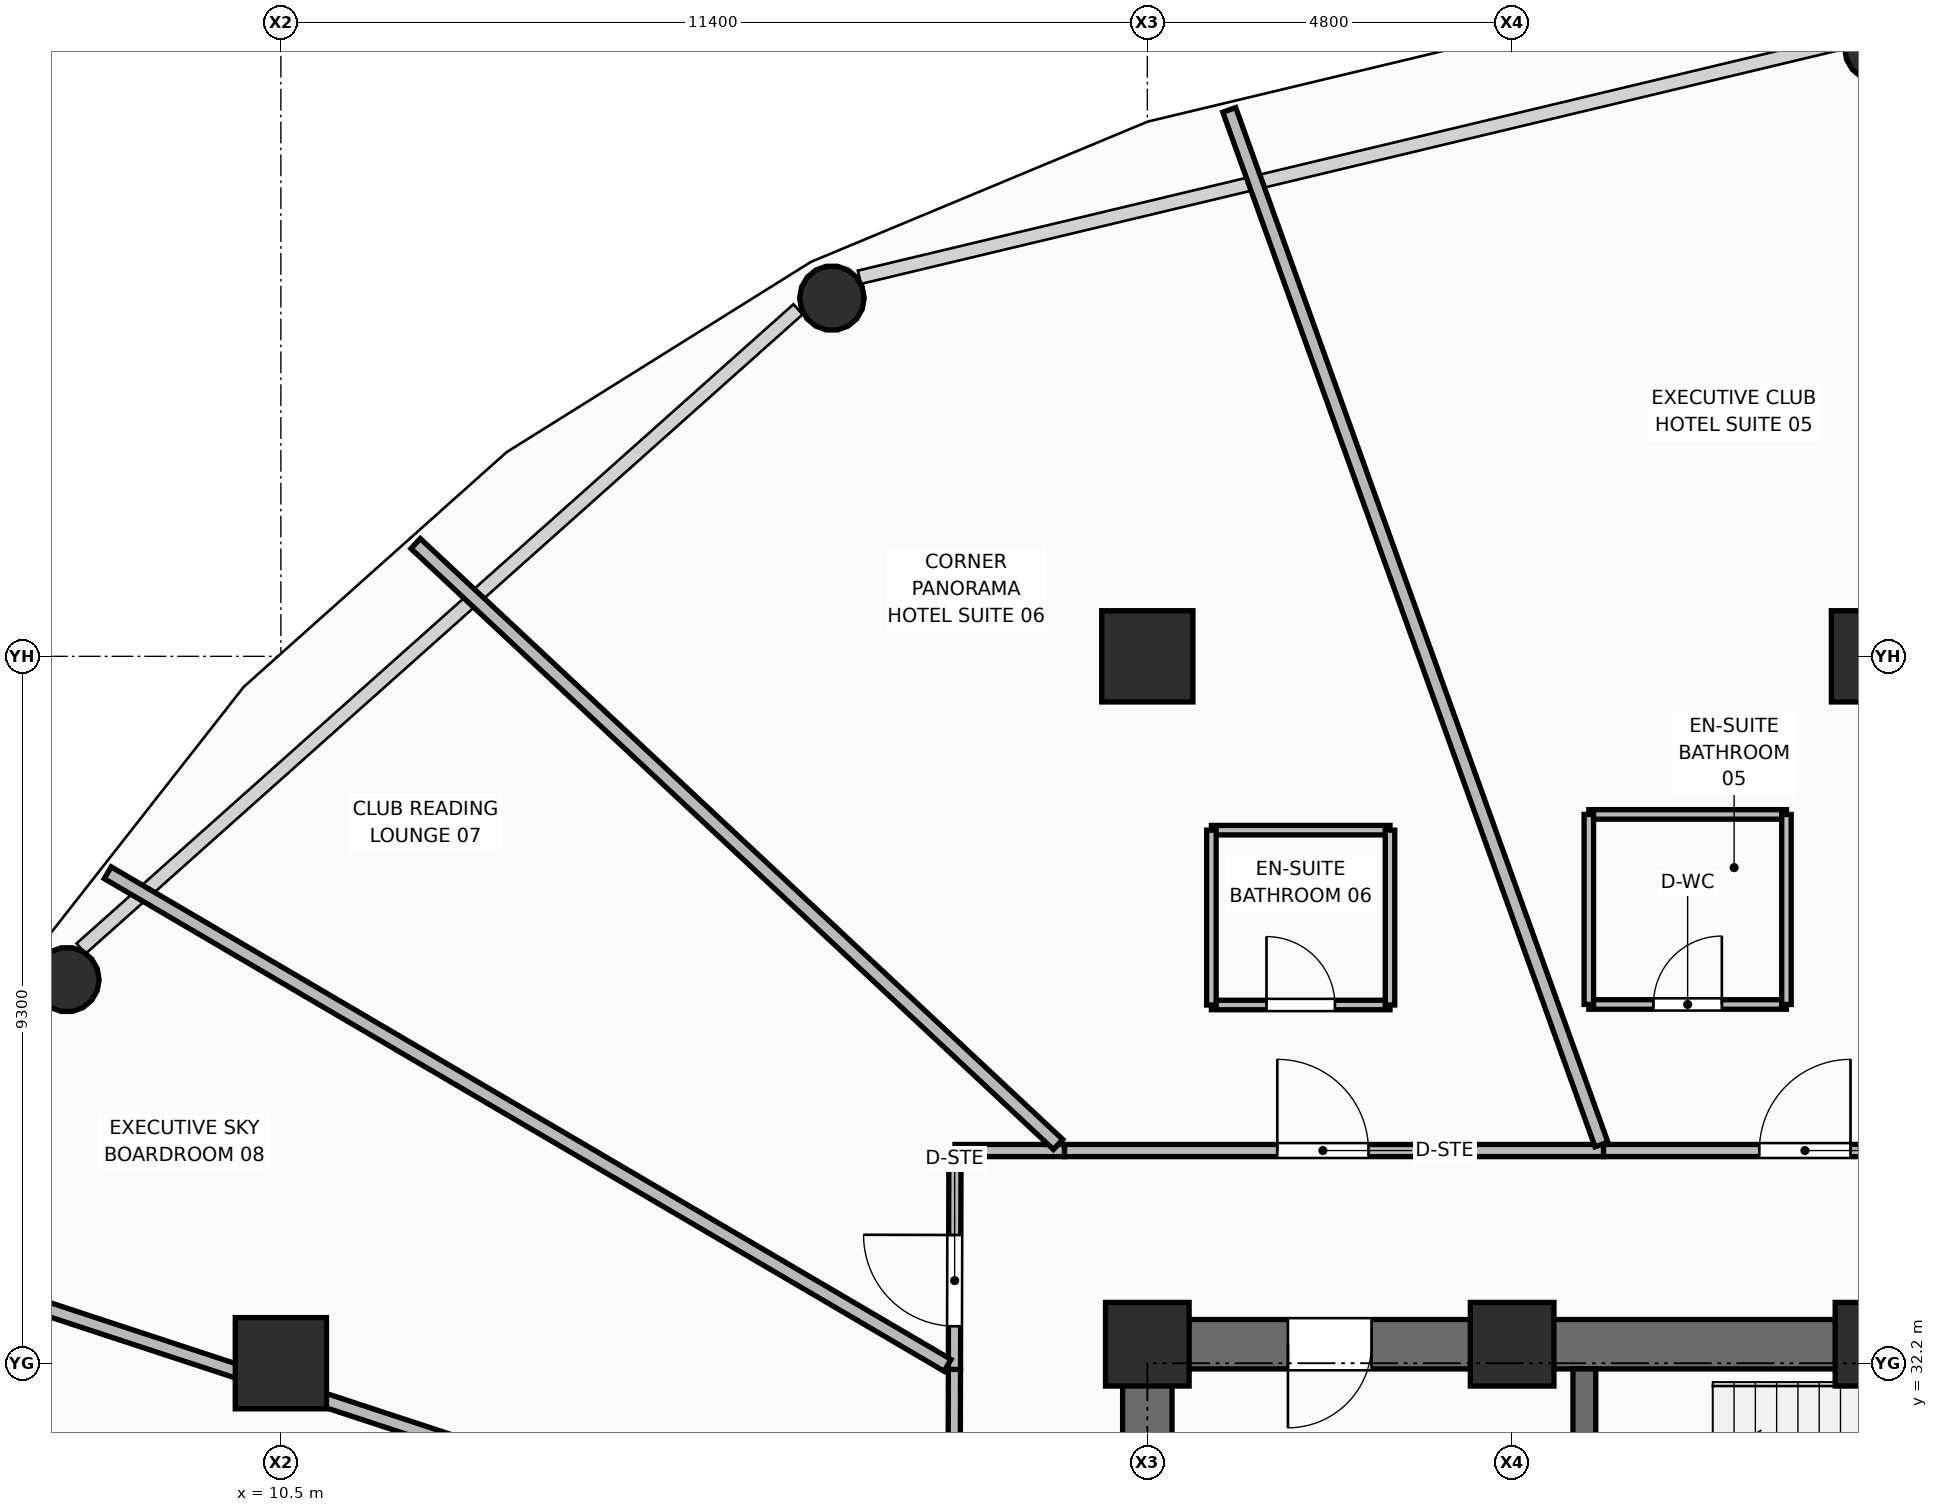
"""IFC4 building model, lengths in metres.
Left out: names, types, materials, properties, quantities, classifications, styles, units other than length and angle.
Written with IfcOpenShell. Run it as: python <this file> out.ifc"""

import sys

from ifc_helpers import new_model, si_unit, direction, frame, frame_2d, origin, origin_2d, place, context, subcontext, project, spatial, rectangle, hollow_rectangle, hollow_circle, extrude, element, fill, save


model = new_model("IFC4")
c1 = context("Model", 3, precision=1e-05, world=origin(), true_north=direction((0.0, 1.0)))
c2 = subcontext(c1, "Body", "Model", "MODEL_VIEW")
j1 = project(units=[si_unit("LENGTHUNIT", "METRE"), si_unit("PLANEANGLEUNIT", "RADIAN")], contexts=[c1])
p1 = place(None, origin())
s1 = spatial("IfcSite", under=j1, at=p1, CompositionType="ELEMENT")
p2 = place(p1, origin())
s2 = spatial("IfcBuilding", under=s1, at=p2, CompositionType="ELEMENT")
p3 = place(p2, frame((0.0, 0.0, 83.25)))
s3 = spatial("IfcBuildingStorey", under=s2, at=p3, CompositionType="ELEMENT", Elevation=83.25)
for number, where, z_axis, x_axis in (
    (1, (21.9, 32.45, 0.0), (0.0, 0.0, 1.0), (1.0, 0.0, 0.0)),
    (2, (26.7, 32.45, 0.0), (0.0, 0.0, 1.0), (1.0, 0.0, 0.0)),
    (3, (31.5, 32.45, 0.0), (0.0, 0.0, 1.0), (1.0, 0.0, 0.0)),
):
    element("IfcColumn", number, at=place(p3, frame(where, z_axis=z_axis, x_axis=x_axis)), inside=s3, PredefinedType="COLUMN", context=c2, shape_type="SweptSolid", body=[
        extrude(rectangle(XDim=1.1, YDim=1.1, at=origin_2d()), origin(), (0.0, 0.0, 1.0), 3.75),
    ])
for number, where, z_axis, x_axis in (
    (4, (10.5, 32.2, 0.0), (0.0, 0.0, 1.0), (1.0, 0.0, 0.0)),
    (5, (21.9, 41.5, 0.0), (0.0, 0.0, 1.0), (1.0, 0.0, 0.0)),
    (6, (31.5, 41.5, 0.0), (0.0, 0.0, 1.0), (1.0, 0.0, 0.0)),
):
    element("IfcColumn", number, at=place(p3, frame(where, z_axis=z_axis, x_axis=x_axis)), inside=s3, PredefinedType="COLUMN", context=c2, shape_type="SweptSolid", body=[
        extrude(hollow_rectangle(XDim=1.2, YDim=1.2, WallThickness=0.045, at=origin_2d()), origin(), (0.0, 0.0, 1.0), 3.75),
    ])
for number, where, z_axis, x_axis in (
    (7, (31.5, 49.495, 0.0), (0.0, 0.0, 1.0), (1.0, 0.0, 0.0)),
    (8, (17.75, 46.213, 0.0), (0.0, 0.0, 1.0), (1.0, 0.0, 0.0)),
    (9, (7.684, 37.247, 0.0), (0.0, 0.0, 1.0), (1.0, 0.0, 0.0)),
):
    element("IfcColumn", number, at=place(p3, frame(where, z_axis=z_axis, x_axis=x_axis)), inside=s3, PredefinedType="COLUMN", context=c2, shape_type="SweptSolid", body=[
        extrude(hollow_circle(Radius=0.425, WallThickness=0.04, at=origin_2d()), origin(), (0.0, 0.0, 1.0), 3.57),
    ])
p4 = place(p3, frame((21.575, 32.45, 0.0), z_axis=(0.0, 0.0, 1.0), x_axis=(1.0, 0.0, 0.0)))
e10 = element("IfcWall", 10, at=p4, inside=s3, PredefinedType="SHEAR", context=c2, shape_type="SweptSolid", body=[
    extrude(rectangle(XDim=19.85, YDim=0.65, at=frame_2d((9.925, 0.0))), origin(), (0.0, 0.0, 1.0), 3.57),
])
p5 = place(p4, frame((2.175, 0.0, 0.0)))
e11 = element("IfcOpeningElement", 11, at=p5, cuts=e10, PredefinedType="OPENING", context=c2, shape_type="SweptSolid", body=[
    extrude(rectangle(XDim=1.1, YDim=2.1, at=frame_2d((0.55, 1.05))), frame((0.0, 0.335, 0.0), z_axis=(0.0, -1.0, 0.0), x_axis=(1.0, 0.0, 0.0)), (0.0, 0.0, 1.0), 0.67),
])
p6 = place(p4, frame((15.565, 0.0, 0.0)))
e12 = element("IfcOpeningElement", 12, at=p6, cuts=e10, PredefinedType="OPENING", context=c2, shape_type="SweptSolid", body=[
    extrude(rectangle(XDim=1.0, YDim=2.1, at=frame_2d((0.5, 1.05))), frame((0.0, 0.335, 0.0), z_axis=(0.0, -1.0, 0.0), x_axis=(1.0, 0.0, 0.0)), (0.0, 0.0, 1.0), 0.67),
])
p7 = place(p4, frame((17.575, 0.0, 0.0)))
e13 = element("IfcOpeningElement", 13, at=p7, cuts=e10, PredefinedType="OPENING", context=c2, shape_type="SweptSolid", body=[
    extrude(rectangle(XDim=0.9, YDim=2.1, at=frame_2d((0.45, 1.05))), frame((0.0, 0.335, 0.0), z_axis=(0.0, -1.0, 0.0), x_axis=(1.0, 0.0, 0.0)), (0.0, 0.0, 1.0), 0.67),
])
p8 = place(p3, frame((21.9, 18.125, 0.0), z_axis=(0.0, 0.0, 1.0), x_axis=(0.0, 1.0, 0.0)))
e14 = element("IfcWall", 14, at=p8, inside=s3, PredefinedType="SHEAR", context=c2, shape_type="SweptSolid", body=[
    extrude(rectangle(XDim=14.0, YDim=0.65, at=frame_2d((7.0, 0.0))), origin(), (0.0, 0.0, 1.0), 3.57),
])
p9 = place(p3, frame((27.65, 28.75, 0.0), z_axis=(0.0, 0.0, 1.0), x_axis=(0.0, 1.0, 0.0)))
e15 = element("IfcWall", 15, at=p9, inside=s3, PredefinedType="SHEAR", context=c2, shape_type="SweptSolid", body=[
    extrude(rectangle(XDim=3.375, YDim=0.3, at=frame_2d((1.688, 0.0))), origin(), (0.0, 0.0, 1.0), 3.57),
])
p10 = place(p9, frame((1.0, 0.0, 0.0)))
e16 = element("IfcOpeningElement", 16, at=p10, cuts=e15, PredefinedType="OPENING", context=c2, shape_type="SweptSolid", body=[
    extrude(rectangle(XDim=1.05, YDim=2.1, at=frame_2d((0.525, 1.05))), frame((0.0, 0.16, 0.0), z_axis=(0.0, -1.0, 0.0), x_axis=(1.0, 0.0, 0.0)), (0.0, 0.0, 1.0), 0.32),
])
p11 = place(p3, frame((19.355, 28.993, 0.0), z_axis=(0.0, 0.0, 1.0), x_axis=(0.002264911404, 0.999997435085, 0.0)))
e17 = element("IfcWall", 17, at=p11, inside=s3, PredefinedType="PARTITIONING", context=c2, shape_type="SweptSolid", body=[
    extrude(rectangle(XDim=3.126, YDim=0.16, at=frame_2d((1.563, 0.0))), origin(), (0.0, 0.0, 1.0), 3.55),
])
p12 = place(p11, frame((0.598, 0.0, 0.0)))
e18 = element("IfcOpeningElement", 18, at=p12, cuts=e17, PredefinedType="OPENING", context=c2, shape_type="SweptSolid", body=[
    extrude(rectangle(XDim=1.2, YDim=2.1, at=frame_2d((0.6, 1.05))), frame((0.0, 0.09, 0.0), z_axis=(0.0, -1.0, 0.0), x_axis=(1.0, 0.0, 0.0)), (0.0, 0.0, 1.0), 0.18),
])
p13 = place(p3, frame((19.362, 32.119, 0.0), z_axis=(0.0, 0.0, 1.0), x_axis=(0.002374283141, 0.999997181386, 0.0)))
e19 = element("IfcWall", 19, at=p13, inside=s3, PredefinedType="PARTITIONING", context=c2, shape_type="SweptSolid", body=[
    extrude(rectangle(XDim=2.879, YDim=0.16, at=frame_2d((1.439, 0.0))), origin(), (0.0, 0.0, 1.0), 2.928),
])
p14 = place(p13, frame((0.568, 0.0, 0.0)))
e20 = element("IfcOpeningElement", 20, at=p14, cuts=e19, PredefinedType="OPENING", context=c2, shape_type="SweptSolid", body=[
    extrude(rectangle(XDim=1.2, YDim=2.1, at=frame_2d((0.6, 1.05))), frame((0.0, 0.09, 0.0), z_axis=(0.0, -1.0, 0.0), x_axis=(1.0, 0.0, 0.0)), (0.0, 0.0, 1.0), 0.18),
])
p15 = place(p3, frame((19.369, 34.998, 0.0), z_axis=(0.0, 0.0, 1.0), x_axis=(1.0, 0.0, 0.0)))
e21 = element("IfcWall", 21, at=p15, inside=s3, PredefinedType="PARTITIONING", context=c2, shape_type="SweptSolid", body=[
    extrude(rectangle(XDim=1.442, YDim=0.16, at=frame_2d((0.721, 0.0))), origin(), (0.0, 0.0, 1.0), 3.55),
])
p16 = place(p3, frame((20.811, 34.998, 0.0), z_axis=(0.0, 0.0, 1.0), x_axis=(1.0, 0.0, 0.0)))
e22 = element("IfcWall", 22, at=p16, inside=s3, PredefinedType="PARTITIONING", context=c2, shape_type="SweptSolid", body=[
    extrude(rectangle(XDim=7.092, YDim=0.16, at=frame_2d((3.546, 0.0))), origin(), (0.0, 0.0, 1.0), 2.928),
])
p17 = place(p16, frame((2.799, 0.0, 0.0)))
e23 = element("IfcOpeningElement", 23, at=p17, cuts=e22, PredefinedType="OPENING", context=c2, shape_type="SweptSolid", body=[
    extrude(rectangle(XDim=1.2, YDim=2.1, at=frame_2d((0.6, 1.05))), frame((0.0, 0.09, 0.0), z_axis=(0.0, -1.0, 0.0), x_axis=(1.0, 0.0, 0.0)), (0.0, 0.0, 1.0), 0.18),
])
p18 = place(p3, frame((27.903, 34.998, 0.0), z_axis=(0.0, 0.0, 1.0), x_axis=(1.0, 0.0, 0.0)))
e24 = element("IfcWall", 24, at=p18, inside=s3, PredefinedType="PARTITIONING", context=c2, shape_type="SweptSolid", body=[
    extrude(rectangle(XDim=5.153, YDim=0.16, at=frame_2d((2.576, 0.0))), origin(), (0.0, 0.0, 1.0), 2.928),
])
p19 = place(p18, frame((2.049, 0.0, 0.0)))
e25 = element("IfcOpeningElement", 25, at=p19, cuts=e24, PredefinedType="OPENING", context=c2, shape_type="SweptSolid", body=[
    extrude(rectangle(XDim=1.2, YDim=2.1, at=frame_2d((0.6, 1.05))), frame((0.0, 0.09, 0.0), z_axis=(0.0, -1.0, 0.0), x_axis=(1.0, 0.0, 0.0)), (0.0, 0.0, 1.0), 0.18),
])
p20 = place(p3, frame((27.875, 35.078, 0.0), z_axis=(0.0, 0.0, 1.0), x_axis=(-0.338534786173, 0.940953876952, 0.0)))
e26 = element("IfcWall", 26, at=p20, inside=s3, PredefinedType="PARTITIONING", context=c2, shape_type="SweptSolid", body=[
    extrude(rectangle(XDim=14.465, YDim=0.18, at=frame_2d((7.232, 0.0))), origin(), (0.0, 0.0, 1.0), 2.775),
])
p21 = place(p3, frame((20.726, 35.078, 0.0), z_axis=(0.0, 0.0, 1.0), x_axis=(-0.730389203883, 0.683031193176, 0.0)))
e27 = element("IfcWall", 27, at=p21, inside=s3, PredefinedType="PARTITIONING", context=c2, shape_type="SweptSolid", body=[
    extrude(rectangle(XDim=11.573, YDim=0.18, at=frame_2d((5.787, 0.0))), origin(), (0.0, 0.0, 1.0), 2.775),
])
p22 = place(p3, frame((19.272, 32.172, 0.0), z_axis=(0.0, 0.0, 1.0), x_axis=(-0.862584123078, 0.505913659248, 0.0)))
e28 = element("IfcWall", 28, at=p22, inside=s3, PredefinedType="PARTITIONING", context=c2, shape_type="SweptSolid", body=[
    extrude(rectangle(XDim=12.81, YDim=0.18, at=frame_2d((6.405, 0.0))), origin(), (0.0, 0.0, 1.0), 2.775),
])
p23 = place(p3, frame((19.272, 29.02, 0.0), z_axis=(0.0, 0.0, 1.0), x_axis=(-0.949981656655, 0.312305702829, 0.0)))
e29 = element("IfcWall", 29, at=p23, inside=s3, PredefinedType="PARTITIONING", context=c2, shape_type="SweptSolid", body=[
    extrude(rectangle(XDim=14.726, YDim=0.18, at=frame_2d((7.363, 0.0))), origin(), (0.0, 0.0, 1.0), 2.775),
])
p24 = place(p3, frame((27.709, 36.92, 0.0), z_axis=(0.0, 0.0, 1.0), x_axis=(1.0, 0.0, 0.0)))
e30 = element("IfcWall", 30, at=p24, inside=s3, PredefinedType="PARTITIONING", context=c2, shape_type="SweptSolid", body=[
    extrude(rectangle(XDim=2.6, YDim=0.125, at=frame_2d((1.3, 0.0))), origin(), (0.0, 0.0, 1.0), 3.55),
])
p25 = place(p24, frame((0.85, 0.0, 0.0)))
e31 = element("IfcOpeningElement", 31, at=p25, cuts=e30, PredefinedType="OPENING", context=c2, shape_type="SweptSolid", body=[
    extrude(rectangle(XDim=0.9, YDim=2.1, at=frame_2d((0.45, 1.05))), frame((0.0, 0.073, 0.0), z_axis=(0.0, -1.0, 0.0), x_axis=(1.0, 0.0, 0.0)), (0.0, 0.0, 1.0), 0.145),
])
p26 = place(p3, frame((27.709, 39.42, 0.0), z_axis=(0.0, 0.0, 1.0), x_axis=(1.0, 0.0, 0.0)))
e32 = element("IfcWall", 32, at=p26, inside=s3, PredefinedType="PARTITIONING", context=c2, shape_type="SweptSolid", body=[
    extrude(rectangle(XDim=2.6, YDim=0.125, at=frame_2d((1.3, 0.0))), origin(), (0.0, 0.0, 1.0), 3.55),
])
for number, where, z_axis, x_axis in (
    (33, (27.709, 36.92, 0.0), (0.0, 0.0, 1.0), (0.0, 1.0, 0.0)),
    (34, (30.309, 36.92, 0.0), (0.0, 0.0, 1.0), (0.0, 1.0, 0.0)),
):
    element("IfcWall", number, at=place(p3, frame(where, z_axis=z_axis, x_axis=x_axis)), inside=s3, PredefinedType="PARTITIONING", context=c2, shape_type="SweptSolid", body=[
        extrude(rectangle(XDim=2.5, YDim=0.125, at=frame_2d((1.25, 0.0))), origin(), (0.0, 0.0, 1.0), 3.55),
    ])
p27 = place(p3, frame((22.743, 36.913, 0.0), z_axis=(0.0, 0.0, 1.0), x_axis=(1.0, 0.0, 0.0)))
e35 = element("IfcWall", 35, at=p27, inside=s3, PredefinedType="PARTITIONING", context=c2, shape_type="SweptSolid", body=[
    extrude(rectangle(XDim=2.35, YDim=0.125, at=frame_2d((1.175, 0.0))), origin(), (0.0, 0.0, 1.0), 3.55),
])
p28 = place(p27, frame((0.725, 0.0, 0.0)))
e36 = element("IfcOpeningElement", 36, at=p28, cuts=e35, PredefinedType="OPENING", context=c2, shape_type="SweptSolid", body=[
    extrude(rectangle(XDim=0.9, YDim=2.1, at=frame_2d((0.45, 1.05))), frame((0.0, 0.073, 0.0), z_axis=(0.0, -1.0, 0.0), x_axis=(1.0, 0.0, 0.0)), (0.0, 0.0, 1.0), 0.145),
])
p29 = place(p3, frame((22.743, 39.213, 0.0), z_axis=(0.0, 0.0, 1.0), x_axis=(1.0, 0.0, 0.0)))
e37 = element("IfcWall", 37, at=p29, inside=s3, PredefinedType="PARTITIONING", context=c2, shape_type="SweptSolid", body=[
    extrude(rectangle(XDim=2.35, YDim=0.125, at=frame_2d((1.175, 0.0))), origin(), (0.0, 0.0, 1.0), 3.55),
])
for number, where, z_axis, x_axis in (
    (38, (22.743, 36.913, 0.0), (0.0, 0.0, 1.0), (0.0, 1.0, 0.0)),
    (39, (25.093, 36.913, 0.0), (0.0, 0.0, 1.0), (0.0, 1.0, 0.0)),
):
    element("IfcWall", number, at=place(p3, frame(where, z_axis=z_axis, x_axis=x_axis)), inside=s3, PredefinedType="PARTITIONING", context=c2, shape_type="SweptSolid", body=[
        extrude(rectangle(XDim=2.3, YDim=0.125, at=frame_2d((1.15, 0.0))), origin(), (0.0, 0.0, 1.0), 3.55),
    ])
p30 = place(p5, frame((1.1, 0.0, 0.0), z_axis=(0.0, 0.0, 1.0), x_axis=(-1.0, 0.0, 0.0)))
e40 = element("IfcDoor", 40, at=p30, inside=s3, OperationType="SINGLE_SWING_RIGHT", PredefinedType="DOOR", context=c2, shape_type="SweptSolid", body=[
    extrude(rectangle(XDim=1.1, YDim=2.1, at=frame_2d((0.55, 1.05))), frame((0.0, 0.025, 0.0), z_axis=(0.0, -1.0, 0.0), x_axis=(1.0, 0.0, 0.0)), (0.0, 0.0, 1.0), 0.05),
])
fill(e11, e40)
p31 = place(p25, origin())
e41 = element("IfcDoor", 41, at=p31, inside=s3, OperationType="SINGLE_SWING_RIGHT", PredefinedType="DOOR", context=c2, shape_type="SweptSolid", body=[
    extrude(rectangle(XDim=0.9, YDim=2.1, at=frame_2d((0.45, 1.05))), frame((0.0, 0.025, 0.0), z_axis=(0.0, -1.0, 0.0), x_axis=(1.0, 0.0, 0.0)), (0.0, 0.0, 1.0), 0.05),
])
fill(e31, e41)
p32 = place(p19, origin())
e42 = element("IfcDoor", 42, at=p32, inside=s3, OperationType="SINGLE_SWING_RIGHT", PredefinedType="DOOR", context=c2, shape_type="SweptSolid", body=[
    extrude(rectangle(XDim=1.2, YDim=2.1, at=frame_2d((0.6, 1.05))), frame((0.0, 0.025, 0.0), z_axis=(0.0, -1.0, 0.0), x_axis=(1.0, 0.0, 0.0)), (0.0, 0.0, 1.0), 0.05),
])
fill(e25, e42)
p33 = place(p28, origin())
e43 = element("IfcDoor", 43, at=p33, inside=s3, OperationType="SINGLE_SWING_LEFT", PredefinedType="DOOR", context=c2, shape_type="SweptSolid", body=[
    extrude(rectangle(XDim=0.9, YDim=2.1, at=frame_2d((0.45, 1.05))), frame((0.0, 0.025, 0.0), z_axis=(0.0, -1.0, 0.0), x_axis=(1.0, 0.0, 0.0)), (0.0, 0.0, 1.0), 0.05),
])
fill(e36, e43)
p34 = place(p17, origin())
e44 = element("IfcDoor", 44, at=p34, inside=s3, OperationType="SINGLE_SWING_LEFT", PredefinedType="DOOR", context=c2, shape_type="SweptSolid", body=[
    extrude(rectangle(XDim=1.2, YDim=2.1, at=frame_2d((0.6, 1.05))), frame((0.0, 0.025, 0.0), z_axis=(0.0, -1.0, 0.0), x_axis=(1.0, 0.0, 0.0)), (0.0, 0.0, 1.0), 0.05),
])
fill(e23, e44)
p35 = place(p14, origin())
e45 = element("IfcDoor", 45, at=p35, inside=s3, OperationType="SINGLE_SWING_RIGHT", PredefinedType="DOOR", context=c2, shape_type="SweptSolid", body=[
    extrude(rectangle(XDim=1.2, YDim=2.1, at=frame_2d((0.6, 1.05))), frame((0.0, 0.025, 0.0), z_axis=(0.0, -1.0, 0.0), x_axis=(1.0, 0.0, 0.0)), (0.0, 0.0, 1.0), 0.05),
])
fill(e20, e45)
save(model, sys.argv[1])
